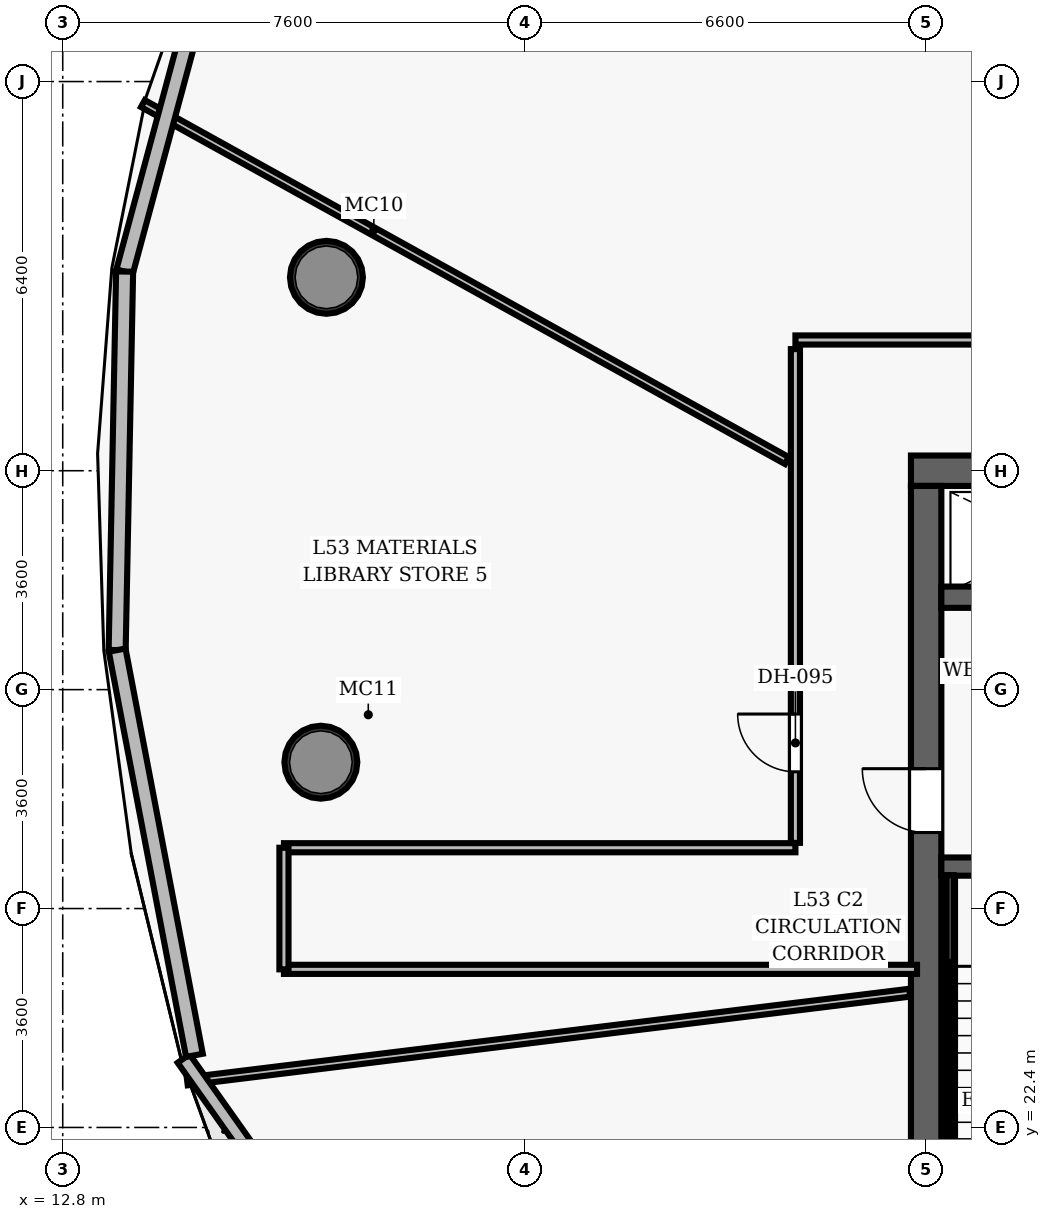
"""IFC4 building model, lengths in metres.
Left out: names, types, materials, properties, quantities, classifications, styles, units other than length and angle.
Written with IfcOpenShell. Run it as: python <this file> out.ifc"""

import sys

from ifc_helpers import new_model, si_unit, direction, frame, frame_2d, origin, origin_2d, place, context, subcontext, project, spatial, rectangle, hollow_circle, extrude, element, fill, save


model = new_model("IFC4")
c1 = context("Model", 3, precision=1e-05, world=origin(), true_north=direction((0.0, 1.0)))
c2 = subcontext(c1, "Body", "Model", "MODEL_VIEW")
j1 = project(units=[si_unit("LENGTHUNIT", "METRE"), si_unit("PLANEANGLEUNIT", "RADIAN")], contexts=[c1])
p1 = place(None, origin())
s1 = spatial("IfcSite", under=j1, at=p1, CompositionType="ELEMENT")
p2 = place(p1, origin())
s2 = spatial("IfcBuilding", under=s1, at=p2, CompositionType="ELEMENT")
p3 = place(p2, frame((0.0, 0.0, 209.7)))
s3 = spatial("IfcBuildingStorey", under=s2, at=p3, CompositionType="ELEMENT", Elevation=209.7)
p4 = place(p3, frame((26.75, 33.2, 0.0), z_axis=(0.0, 0.0, 1.0), x_axis=(1.0, 0.0, 0.0)))
e1 = element("IfcWall", 1, at=p4, inside=s3, PredefinedType="SHEAR", context=c2, shape_type="SweptSolid", body=[
    extrude(rectangle(XDim=22.5, YDim=0.5, at=frame_2d((11.25, 0.0))), origin(), (0.0, 0.0, 1.0), 3.85),
])
p5 = place(p4, frame((4.57, 0.0, 0.0)))
e2 = element("IfcOpeningElement", 2, at=p5, cuts=e1, PredefinedType="OPENING", context=c2, shape_type="SweptSolid", body=[
    extrude(rectangle(XDim=1.05, YDim=2.15, at=frame_2d((0.525, 1.075))), frame((0.0, 0.26, 0.0), z_axis=(0.0, -1.0, 0.0), x_axis=(1.0, 0.0, 0.0)), (0.0, 0.0, 1.0), 0.52),
])
p6 = place(p4, frame((14.47, 0.0, 0.0)))
e3 = element("IfcOpeningElement", 3, at=p6, cuts=e1, PredefinedType="OPENING", context=c2, shape_type="SweptSolid", body=[
    extrude(rectangle(XDim=1.05, YDim=2.15, at=frame_2d((0.525, 1.075))), frame((0.0, 0.26, 0.0), z_axis=(0.0, -1.0, 0.0), x_axis=(1.0, 0.0, 0.0)), (0.0, 0.0, 1.0), 0.52),
])
p7 = place(p3, frame((27.0, 19.05, 0.0), z_axis=(0.0, 0.0, 1.0), x_axis=(0.0, 1.0, 0.0)))
e4 = element("IfcWall", 4, at=p7, inside=s3, PredefinedType="SHEAR", context=c2, shape_type="SweptSolid", body=[
    extrude(rectangle(XDim=13.9, YDim=0.5, at=frame_2d((6.95, 0.0))), origin(), (0.0, 0.0, 1.0), 3.85),
])
p8 = place(p7, frame((8.2, 0.0, 0.0)))
e5 = element("IfcOpeningElement", 5, at=p8, cuts=e4, PredefinedType="OPENING", context=c2, shape_type="SweptSolid", body=[
    extrude(rectangle(XDim=1.05, YDim=2.15, at=frame_2d((0.525, 1.075))), frame((0.0, 0.26, 0.0), z_axis=(0.0, -1.0, 0.0), x_axis=(1.0, 0.0, 0.0)), (0.0, 0.0, 1.0), 0.52),
])
for number, where, z_axis, x_axis in (
    (6, (17.137, 36.381, 0.0), (0.0, 0.0, 1.0), (1.0, 0.0, 0.0)),
    (7, (17.045, 28.406, 0.0), (0.0, 0.0, 1.0), (1.0, 0.0, 0.0)),
):
    element("IfcColumn", number, at=place(p3, frame(where, z_axis=z_axis, x_axis=x_axis)), inside=s3, PredefinedType="COLUMN", context=c2, shape_type="SweptSolid", body=[
        extrude(hollow_circle(Radius=0.6, WallThickness=0.05, at=origin_2d()), origin(), (0.0, 0.0, 1.0), 3.85),
    ])
p9 = place(p3, frame((27.25, 26.69, 0.0), z_axis=(0.0, 0.0, 1.0), x_axis=(1.0, 0.0, 0.0)))
e8 = element("IfcWall", 8, at=p9, inside=s3, PredefinedType="SHEAR", context=c2, shape_type="SweptSolid", body=[
    extrude(rectangle(XDim=3.67, YDim=0.3, at=frame_2d((1.835, 0.0))), origin(), (0.0, 0.0, 1.0), 3.85),
])
p10 = place(p9, frame((1.05, 0.0, 0.0)))
e9 = element("IfcOpeningElement", 9, at=p10, cuts=e8, PredefinedType="OPENING", context=c2, shape_type="SweptSolid", body=[
    extrude(rectangle(XDim=1.1, YDim=2.15, at=frame_2d((0.55, 1.075))), frame((0.0, 0.16, 0.0), z_axis=(0.0, -1.0, 0.0), x_axis=(1.0, 0.0, 0.0)), (0.0, 0.0, 1.0), 0.32),
])
p11 = place(p3, frame((27.395, 19.1, 0.0), z_axis=(0.0, 0.0, 1.0), x_axis=(0.0, 1.0, 0.0)))
e10 = element("IfcWall", 10, at=p11, inside=s3, PredefinedType="SHEAR", context=c2, shape_type="SweptSolid", body=[
    extrude(rectangle(XDim=7.45, YDim=0.12, at=frame_2d((3.725, 0.0))), origin(), (0.0, 0.0, 1.0), 3.85),
])
p12 = place(p3, frame((27.25, 31.12, 0.0), z_axis=(0.0, 0.0, 1.0), x_axis=(1.0, 0.0, 0.0)))
e11 = element("IfcWall", 11, at=p12, inside=s3, PredefinedType="SHEAR", context=c2, shape_type="SweptSolid", body=[
    extrude(rectangle(XDim=3.67, YDim=0.35, at=frame_2d((1.835, 0.0))), origin(), (0.0, 0.0, 1.0), 3.035),
])
p13 = place(p12, frame((1.25, 0.0, 0.0)))
e12 = element("IfcOpeningElement", 12, at=p13, cuts=e11, PredefinedType="OPENING", context=c2, shape_type="SweptSolid", body=[
    extrude(rectangle(XDim=1.1, YDim=2.15, at=frame_2d((0.55, 1.075))), frame((0.0, 0.185, 0.0), z_axis=(0.0, -1.0, 0.0), x_axis=(1.0, 0.0, 0.0)), (0.0, 0.0, 1.0), 0.37),
])
p14 = place(p3, frame((24.85, 35.35, 0.0), z_axis=(0.0, 0.0, 1.0), x_axis=(1.0, 0.0, 0.0)))
e13 = element("IfcWall", 13, at=p14, inside=s3, PredefinedType="PARTITIONING", context=c2, shape_type="SweptSolid", body=[
    extrude(rectangle(XDim=26.0, YDim=0.15, at=frame_2d((13.0, 0.0))), origin(), (0.0, 0.0, 1.0), 3.035),
])
p15 = place(p14, frame((16.182, 0.0, 0.0)))
e14 = element("IfcOpeningElement", 14, at=p15, cuts=e13, PredefinedType="OPENING", context=c2, shape_type="SweptSolid", body=[
    extrude(rectangle(XDim=1.5, YDim=2.2, at=frame_2d((0.75, 1.1))), frame((0.0, 0.085, 0.0), z_axis=(0.0, -1.0, 0.0), x_axis=(1.0, 0.0, 0.0)), (0.0, 0.0, 1.0), 0.17),
])
p16 = place(p14, frame((9.675, 0.0, 0.0)))
e15 = element("IfcOpeningElement", 15, at=p16, cuts=e13, PredefinedType="OPENING", context=c2, shape_type="SweptSolid", body=[
    extrude(rectangle(XDim=0.95, YDim=2.15, at=frame_2d((0.475, 1.075))), frame((0.0, 0.085, 0.0), z_axis=(0.0, -1.0, 0.0), x_axis=(1.0, 0.0, 0.0)), (0.0, 0.0, 1.0), 0.17),
])
p17 = place(p14, frame((5.395, 0.0, 0.0)))
e16 = element("IfcOpeningElement", 16, at=p17, cuts=e13, PredefinedType="OPENING", context=c2, shape_type="SweptSolid", body=[
    extrude(rectangle(XDim=0.95, YDim=2.15, at=frame_2d((0.475, 1.075))), frame((0.0, 0.085, 0.0), z_axis=(0.0, -1.0, 0.0), x_axis=(1.0, 0.0, 0.0)), (0.0, 0.0, 1.0), 0.17),
])
p18 = place(p3, frame((24.85, 27.08, 0.0), z_axis=(0.0, 0.0, 1.0), x_axis=(0.0, 1.0, 0.0)))
e17 = element("IfcWall", 17, at=p18, inside=s3, PredefinedType="PARTITIONING", context=c2, shape_type="SweptSolid", body=[
    extrude(rectangle(XDim=8.12, YDim=0.15, at=frame_2d((4.06, 0.0))), origin(), (0.0, 0.0, 1.0), 3.035),
])
p19 = place(p18, frame((1.169, 0.0, 0.0)))
e18 = element("IfcOpeningElement", 18, at=p19, cuts=e17, PredefinedType="OPENING", context=c2, shape_type="SweptSolid", body=[
    extrude(rectangle(XDim=0.95, YDim=2.15, at=frame_2d((0.475, 1.075))), frame((0.0, 0.085, 0.0), z_axis=(0.0, -1.0, 0.0), x_axis=(1.0, 0.0, 0.0)), (0.0, 0.0, 1.0), 0.17),
])
p20 = place(p3, frame((16.438, 27.0, 0.0), z_axis=(0.0, 0.0, 1.0), x_axis=(1.0, 0.0, 0.0)))
e19 = element("IfcWall", 19, at=p20, inside=s3, PredefinedType="PARTITIONING", context=c2, shape_type="SweptSolid", body=[
    extrude(rectangle(XDim=8.412, YDim=0.15, at=frame_2d((4.206, 0.0))), origin(), (0.0, 0.0, 1.0), 3.035),
])
p21 = place(p3, frame((16.438, 25.0, 0.0), z_axis=(0.0, 0.0, 1.0), x_axis=(1.0, 0.0, 0.0)))
e20 = element("IfcWall", 20, at=p21, inside=s3, PredefinedType="PARTITIONING", context=c2, shape_type="SweptSolid", body=[
    extrude(rectangle(XDim=10.412, YDim=0.15, at=frame_2d((5.206, 0.0))), origin(), (0.0, 0.0, 1.0), 3.035),
])
p22 = place(p3, frame((16.438, 25.0, 0.0), z_axis=(0.0, 0.0, 1.0), x_axis=(0.0, 1.0, 0.0)))
e21 = element("IfcWall", 21, at=p22, inside=s3, PredefinedType="PARTITIONING", context=c2, shape_type="SweptSolid", body=[
    extrude(rectangle(XDim=2.0, YDim=0.15, at=frame_2d((1.0, 0.0))), origin(), (0.0, 0.0, 1.0), 3.035),
])
p23 = place(p3, frame((33.575, 35.49, 0.0), z_axis=(0.0, 0.0, 1.0), x_axis=(-0.422617745277, 0.906308027868, 0.0)))
e22 = element("IfcWall", 22, at=p23, inside=s3, PredefinedType="PARTITIONING", context=c2, shape_type="SweptSolid", body=[
    extrude(rectangle(XDim=16.226, YDim=0.13, at=frame_2d((8.113, 0.0))), origin(), (0.0, 0.0, 1.0), 3.035),
])
p24 = place(p3, frame((24.71, 33.367, 0.0), z_axis=(0.0, 0.0, 1.0), x_axis=(-0.874611459902, 0.484824498357, 0.0)))
e23 = element("IfcWall", 23, at=p24, inside=s3, PredefinedType="PARTITIONING", context=c2, shape_type="SweptSolid", body=[
    extrude(rectangle(XDim=12.11, YDim=0.13, at=frame_2d((6.055, 0.0))), origin(), (0.0, 0.0, 1.0), 3.035),
])
p25 = place(p3, frame((26.73, 24.616, 0.0), z_axis=(0.0, 0.0, 1.0), x_axis=(-0.99254566269, -0.12187332553, 0.0)))
e24 = element("IfcWall", 24, at=p25, inside=s3, PredefinedType="PARTITIONING", context=c2, shape_type="SweptSolid", body=[
    extrude(rectangle(XDim=11.971, YDim=0.13, at=frame_2d((5.986, 0.0))), origin(), (0.0, 0.0, 1.0), 3.035),
])
p26 = place(p3, frame((22.759, 12.279, 0.0), z_axis=(0.0, 0.0, 1.0), x_axis=(-0.577984923356, 0.816047442477, 0.0)))
e25 = element("IfcWall", 25, at=p26, inside=s3, PredefinedType="SOLIDWALL", context=c2, shape_type="SweptSolid", body=[
    extrude(rectangle(XDim=13.791, YDim=0.24, at=frame_2d((6.896, 0.0))), origin(), (0.0, 0.0, 1.0), 2.8),
])
p27 = place(p26, frame((2.031, 0.0, 0.0)))
e26 = element("IfcOpeningElement", 26, at=p27, cuts=e25, PredefinedType="OPENING", context=c2, shape_type="SweptSolid", body=[
    extrude(rectangle(XDim=1.1, YDim=2.2, at=frame_2d((0.55, 1.1))), frame((0.0, 0.13, 0.0), z_axis=(0.0, -1.0, 0.0), x_axis=(1.0, 0.0, 0.0)), (0.0, 0.0, 1.0), 0.26),
])
p28 = place(p3, frame((13.818, 36.475, 0.0), z_axis=(0.0, 0.0, 1.0), x_axis=(0.260470130189, 0.965481906241, 0.0)))
e27 = element("IfcWall", 27, at=p28, inside=s3, PredefinedType="SOLIDWALL", context=c2, shape_type="SweptSolid", body=[
    extrude(rectangle(XDim=5.465, YDim=0.28, at=frame_2d((2.732, 0.0))), origin(), (0.0, 0.0, 1.0), 3.62),
])
p29 = place(p3, frame((13.695, 30.25, 0.0), z_axis=(0.0, 0.0, 1.0), x_axis=(0.019683232509, 0.999806266413, 0.0)))
e28 = element("IfcWall", 28, at=p29, inside=s3, PredefinedType="SOLIDWALL", context=c2, shape_type="SweptSolid", body=[
    extrude(rectangle(XDim=6.227, YDim=0.28, at=frame_2d((3.113, 0.0))), origin(), (0.0, 0.0, 1.0), 3.62),
])
p30 = place(p3, frame((14.966, 23.586, 0.0), z_axis=(0.0, 0.0, 1.0), x_axis=(-0.187340299472, 0.982295073893, 0.0)))
e29 = element("IfcWall", 29, at=p30, inside=s3, PredefinedType="SOLIDWALL", context=c2, shape_type="SweptSolid", body=[
    extrude(rectangle(XDim=6.784, YDim=0.28, at=frame_2d((3.392, 0.0))), origin(), (0.0, 0.0, 1.0), 3.62),
])
p31 = place(p8, origin())
e30 = element("IfcDoor", 30, at=p31, inside=s3, OperationType="SINGLE_SWING_RIGHT", PredefinedType="DOOR", context=c2, shape_type="SweptSolid", body=[
    extrude(rectangle(XDim=1.05, YDim=2.15, at=frame_2d((0.525, 1.075))), frame((0.0, 0.025, 0.0), z_axis=(0.0, -1.0, 0.0), x_axis=(1.0, 0.0, 0.0)), (0.0, 0.0, 1.0), 0.05),
])
fill(e5, e30)
p32 = place(p19, origin())
e31 = element("IfcDoor", 31, at=p32, inside=s3, OperationType="SINGLE_SWING_RIGHT", PredefinedType="DOOR", context=c2, shape_type="SweptSolid", body=[
    extrude(rectangle(XDim=0.95, YDim=2.15, at=frame_2d((0.475, 1.075))), frame((0.0, 0.025, 0.0), z_axis=(0.0, -1.0, 0.0), x_axis=(1.0, 0.0, 0.0)), (0.0, 0.0, 1.0), 0.05),
])
fill(e18, e31)
save(model, sys.argv[1])
